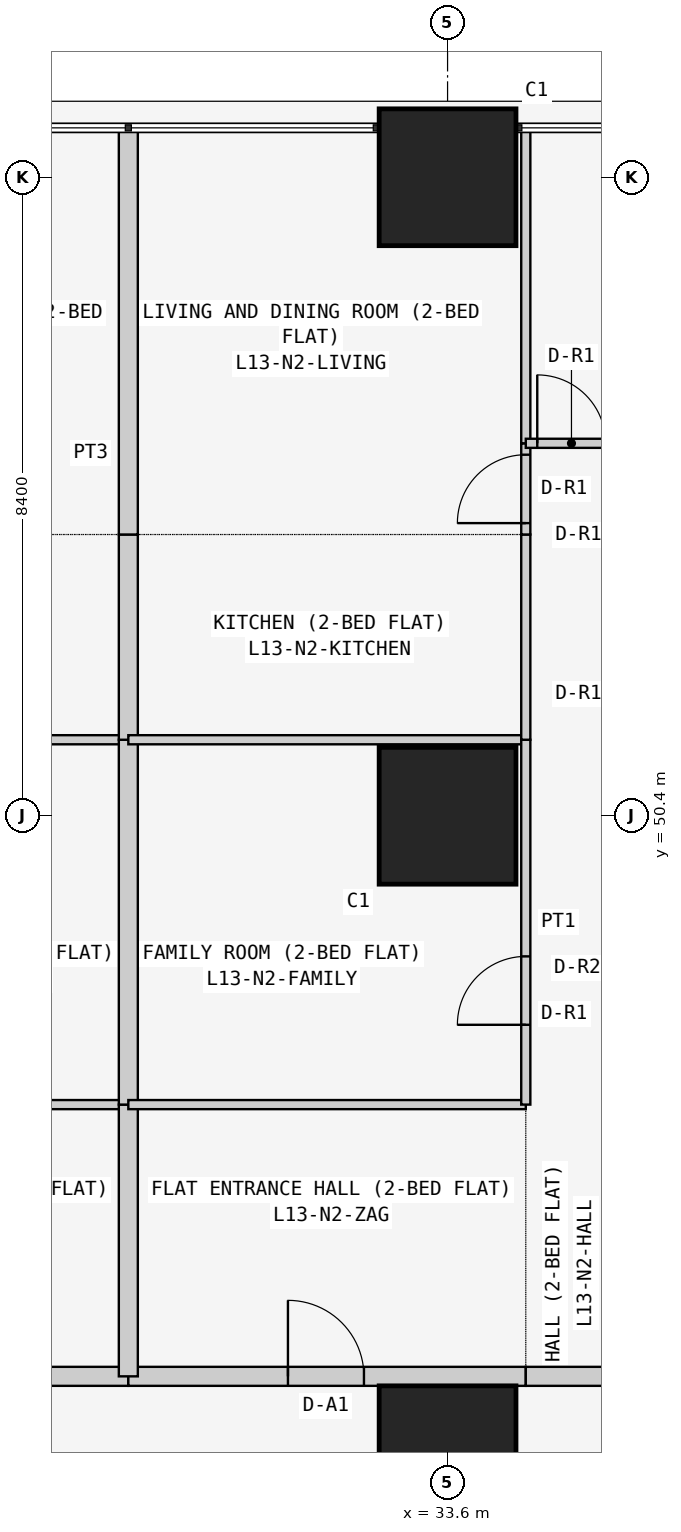
"""IFC4 building model, lengths in metres.
Left out: names, types, materials, properties, quantities, classifications, styles, units other than length and angle.
Written with IfcOpenShell. Run it as: python <this file> out.ifc"""

import sys

from ifc_helpers import new_model, si_unit, direction, frame, frame_2d, origin, origin_2d, place, context, subcontext, project, spatial, rectangle, extrude, element, fill, save


model = new_model("IFC4")
c1 = context("Model", 3, precision=1e-05, world=origin(), true_north=direction((0.0, 1.0)))
c2 = subcontext(c1, "Body", "Model", "MODEL_VIEW")
j1 = project(units=[si_unit("LENGTHUNIT", "METRE"), si_unit("PLANEANGLEUNIT", "RADIAN")], contexts=[c1])
p1 = place(None, origin())
s1 = spatial("IfcSite", under=j1, at=p1, CompositionType="ELEMENT")
p2 = place(p1, origin())
s2 = spatial("IfcBuilding", under=s1, at=p2, CompositionType="ELEMENT")
p3 = place(p2, frame((0.0, 0.0, 56.1)))
s3 = spatial("IfcBuildingStorey", under=s2, at=p3, CompositionType="ELEMENT", Elevation=56.1)
for number, where, z_axis, x_axis in (
    (1, (33.6, 42.0, 0.0), (0.0, 0.0, 1.0), (1.0, 0.0, 0.0)),
    (2, (33.6, 50.4, 0.0), (0.0, 0.0, 1.0), (1.0, 0.0, 0.0)),
    (3, (33.6, 58.8, 0.0), (0.0, 0.0, 1.0), (1.0, 0.0, 0.0)),
):
    element("IfcColumn", number, at=place(p3, frame(where, z_axis=z_axis, x_axis=x_axis)), inside=s3, PredefinedType="COLUMN", context=c2, shape_type="SweptSolid", body=[
        extrude(rectangle(XDim=1.8, YDim=1.8, at=origin_2d()), origin(), (0.0, 0.0, 1.0), 3.6),
    ])
p4 = place(p3, frame((24.171, 43.025, 0.0), z_axis=(0.0, 0.0, 1.0), x_axis=(1.0, 0.0, 0.0)))
e4 = element("IfcWall", 4, at=p4, inside=s3, PredefinedType="PARTITIONING", context=c2, shape_type="SweptSolid", body=[
    extrude(rectangle(XDim=5.229, YDim=0.25, at=frame_2d((2.615, 0.0))), origin(), (0.0, 0.0, 1.0), 3.45),
])
p5 = place(p4, frame((2.129, 0.0, 0.0)))
e5 = element("IfcOpeningElement", 5, at=p5, cuts=e4, PredefinedType="OPENING", context=c2, shape_type="SweptSolid", body=[
    extrude(rectangle(XDim=1.0, YDim=2.1, at=frame_2d((0.5, 1.05))), frame((0.0, 0.135, 0.0), z_axis=(0.0, -1.0, 0.0), x_axis=(1.0, 0.0, 0.0)), (0.0, 0.0, 1.0), 0.27),
])
p6 = place(p3, frame((29.4, 43.025, 0.0), z_axis=(0.0, 0.0, 1.0), x_axis=(1.0, 0.0, 0.0)))
e6 = element("IfcWall", 6, at=p6, inside=s3, PredefinedType="PARTITIONING", context=c2, shape_type="SweptSolid", body=[
    extrude(rectangle(XDim=5.229, YDim=0.25, at=frame_2d((2.615, 0.0))), origin(), (0.0, 0.0, 1.0), 3.45),
])
p7 = place(p6, frame((2.1, 0.0, 0.0)))
e7 = element("IfcOpeningElement", 7, at=p7, cuts=e6, PredefinedType="OPENING", context=c2, shape_type="SweptSolid", body=[
    extrude(rectangle(XDim=1.0, YDim=2.1, at=frame_2d((0.5, 1.05))), frame((0.0, 0.135, 0.0), z_axis=(0.0, -1.0, 0.0), x_axis=(1.0, 0.0, 0.0)), (0.0, 0.0, 1.0), 0.27),
])
p8 = place(p3, frame((34.629, 43.025, 0.0), z_axis=(0.0, 0.0, 1.0), x_axis=(1.0, 0.0, 0.0)))
e8 = element("IfcWall", 8, at=p8, inside=s3, PredefinedType="PARTITIONING", context=c2, shape_type="SweptSolid", body=[
    extrude(rectangle(XDim=1.2, YDim=0.25, at=frame_2d((0.6, 0.0))), origin(), (0.0, 0.0, 1.0), 3.45),
])
p9 = place(p3, frame((29.4, 46.6, 0.0), z_axis=(0.0, 0.0, 1.0), x_axis=(-1.0, 0.0, 0.0)))
e9 = element("IfcWall", 9, at=p9, inside=s3, PredefinedType="PARTITIONING", context=c2, shape_type="SweptSolid", body=[
    extrude(rectangle(XDim=5.229, YDim=0.12, at=frame_2d((2.615, 0.0))), origin(), (0.0, 0.0, 1.0), 3.45),
])
p10 = place(p3, frame((29.4, 43.025, 0.0), z_axis=(0.0, 0.0, 1.0), x_axis=(0.0, 1.0, 0.0)))
e10 = element("IfcWall", 10, at=p10, inside=s3, PredefinedType="PARTITIONING", context=c2, shape_type="SweptSolid", body=[
    extrude(rectangle(XDim=3.575, YDim=0.25, at=frame_2d((1.788, 0.0))), origin(), (0.0, 0.0, 1.0), 2.848),
])
p11 = place(p3, frame((29.4, 51.4, 0.0), z_axis=(0.0, 0.0, 1.0), x_axis=(-1.0, 0.0, 0.0)))
e11 = element("IfcWall", 11, at=p11, inside=s3, PredefinedType="PARTITIONING", context=c2, shape_type="SweptSolid", body=[
    extrude(rectangle(XDim=5.229, YDim=0.12, at=frame_2d((2.615, 0.0))), origin(), (0.0, 0.0, 1.0), 3.45),
])
p12 = place(p3, frame((29.4, 46.6, 0.0), z_axis=(0.0, 0.0, 1.0), x_axis=(0.0, 1.0, 0.0)))
e12 = element("IfcWall", 12, at=p12, inside=s3, PredefinedType="PARTITIONING", context=c2, shape_type="SweptSolid", body=[
    extrude(rectangle(XDim=4.8, YDim=0.25, at=frame_2d((2.4, 0.0))), origin(), (0.0, 0.0, 1.0), 2.848),
])
p13 = place(p3, frame((29.4, 51.4, 0.0), z_axis=(0.0, 0.0, 1.0), x_axis=(0.0, 1.0, 0.0)))
e13 = element("IfcWall", 13, at=p13, inside=s3, PredefinedType="PARTITIONING", context=c2, shape_type="SweptSolid", body=[
    extrude(rectangle(XDim=2.7, YDim=0.25, at=frame_2d((1.35, 0.0))), origin(), (0.0, 0.0, 1.0), 2.848),
])
p14 = place(p3, frame((29.4, 54.1, 0.0), z_axis=(0.0, 0.0, 1.0), x_axis=(0.0, 1.0, 0.0)))
e14 = element("IfcWall", 14, at=p14, inside=s3, PredefinedType="PARTITIONING", context=c2, shape_type="SweptSolid", body=[
    extrude(rectangle(XDim=5.35, YDim=0.25, at=frame_2d((2.675, 0.0))), origin(), (0.0, 0.0, 1.0), 2.848),
])
for number, where, z_axis, x_axis in (
    (15, (29.4, 46.6, 0.0), (0.0, 0.0, 1.0), (1.0, 0.0, 0.0)),
    (16, (29.4, 51.4, 0.0), (0.0, 0.0, 1.0), (1.0, 0.0, 0.0)),
):
    element("IfcWall", number, at=place(p3, frame(where, z_axis=z_axis, x_axis=x_axis)), inside=s3, PredefinedType="PARTITIONING", context=c2, shape_type="SweptSolid", body=[
        extrude(rectangle(XDim=5.229, YDim=0.12, at=frame_2d((2.615, 0.0))), origin(), (0.0, 0.0, 1.0), 3.45),
    ])
p15 = place(p3, frame((34.629, 51.4, 0.0), z_axis=(0.0, 0.0, 1.0), x_axis=(0.0, -1.0, 0.0)))
e17 = element("IfcWall", 17, at=p15, inside=s3, PredefinedType="PARTITIONING", context=c2, shape_type="SweptSolid", body=[
    extrude(rectangle(XDim=4.8, YDim=0.12, at=frame_2d((2.4, 0.0))), origin(), (0.0, 0.0, 1.0), 3.45),
])
p16 = place(p15, frame((2.85, 0.0, 0.0)))
e18 = element("IfcOpeningElement", 18, at=p16, cuts=e17, PredefinedType="OPENING", context=c2, shape_type="SweptSolid", body=[
    extrude(rectangle(XDim=0.9, YDim=2.1, at=frame_2d((0.45, 1.05))), frame((0.0, 0.07, 0.0), z_axis=(0.0, -1.0, 0.0), x_axis=(1.0, 0.0, 0.0)), (0.0, 0.0, 1.0), 0.14),
])
p17 = place(p3, frame((34.629, 54.1, 0.0), z_axis=(0.0, 0.0, 1.0), x_axis=(0.0, -1.0, 0.0)))
e19 = element("IfcWall", 19, at=p17, inside=s3, PredefinedType="PARTITIONING", context=c2, shape_type="SweptSolid", body=[
    extrude(rectangle(XDim=2.7, YDim=0.12, at=frame_2d((1.35, 0.0))), origin(), (0.0, 0.0, 1.0), 3.45),
])
p18 = place(p3, frame((34.629, 55.3, 0.0), z_axis=(0.0, 0.0, 1.0), x_axis=(0.0, -1.0, 0.0)))
e20 = element("IfcWall", 20, at=p18, inside=s3, PredefinedType="PARTITIONING", context=c2, shape_type="SweptSolid", body=[
    extrude(rectangle(XDim=1.2, YDim=0.12, at=frame_2d((0.6, 0.0))), origin(), (0.0, 0.0, 1.0), 3.45),
])
p19 = place(p18, frame((0.15, 0.0, 0.0)))
e21 = element("IfcOpeningElement", 21, at=p19, cuts=e20, PredefinedType="OPENING", context=c2, shape_type="SweptSolid", body=[
    extrude(rectangle(XDim=0.9, YDim=2.1, at=frame_2d((0.45, 1.05))), frame((0.0, 0.07, 0.0), z_axis=(0.0, -1.0, 0.0), x_axis=(1.0, 0.0, 0.0)), (0.0, 0.0, 1.0), 0.14),
])
p20 = place(p3, frame((34.629, 59.45, 0.0), z_axis=(0.0, 0.0, 1.0), x_axis=(0.0, -1.0, 0.0)))
e22 = element("IfcWall", 22, at=p20, inside=s3, PredefinedType="PARTITIONING", context=c2, shape_type="SweptSolid", body=[
    extrude(rectangle(XDim=4.15, YDim=0.12, at=frame_2d((2.075, 0.0))), origin(), (0.0, 0.0, 1.0), 3.45),
])
p21 = place(p3, frame((34.629, 55.3, 0.0), z_axis=(0.0, 0.0, 1.0), x_axis=(1.0, 0.0, 0.0)))
e23 = element("IfcWall", 23, at=p21, inside=s3, PredefinedType="PARTITIONING", context=c2, shape_type="SweptSolid", body=[
    extrude(rectangle(XDim=1.2, YDim=0.12, at=frame_2d((0.6, 0.0))), origin(), (0.0, 0.0, 1.0), 3.45),
])
p22 = place(p21, frame((0.151, 0.0, 0.0)))
e24 = element("IfcOpeningElement", 24, at=p22, cuts=e23, PredefinedType="OPENING", context=c2, shape_type="SweptSolid", body=[
    extrude(rectangle(XDim=0.9, YDim=2.1, at=frame_2d((0.45, 1.05))), frame((0.0, 0.07, 0.0), z_axis=(0.0, -1.0, 0.0), x_axis=(1.0, 0.0, 0.0)), (0.0, 0.0, 1.0), 0.14),
])
p23 = place(p7, origin())
e25 = element("IfcDoor", 25, at=p23, inside=s3, OperationType="SINGLE_SWING_LEFT", PredefinedType="DOOR", context=c2, shape_type="SweptSolid", body=[
    extrude(rectangle(XDim=1.0, YDim=2.1, at=frame_2d((0.5, 1.05))), frame((0.0, 0.025, 0.0), z_axis=(0.0, -1.0, 0.0), x_axis=(1.0, 0.0, 0.0)), (0.0, 0.0, 1.0), 0.05),
])
fill(e7, e25)
p24 = place(p16, frame((0.9, 0.0, 0.0), z_axis=(0.0, 0.0, 1.0), x_axis=(-1.0, 0.0, 0.0)))
e26 = element("IfcDoor", 26, at=p24, inside=s3, OperationType="SINGLE_SWING_LEFT", PredefinedType="DOOR", context=c2, shape_type="SweptSolid", body=[
    extrude(rectangle(XDim=0.9, YDim=2.1, at=frame_2d((0.45, 1.05))), frame((0.0, 0.025, 0.0), z_axis=(0.0, -1.0, 0.0), x_axis=(1.0, 0.0, 0.0)), (0.0, 0.0, 1.0), 0.05),
])
fill(e18, e26)
p25 = place(p19, frame((0.9, 0.0, 0.0), z_axis=(0.0, 0.0, 1.0), x_axis=(-1.0, 0.0, 0.0)))
e27 = element("IfcDoor", 27, at=p25, inside=s3, OperationType="SINGLE_SWING_LEFT", PredefinedType="DOOR", context=c2, shape_type="SweptSolid", body=[
    extrude(rectangle(XDim=0.9, YDim=2.1, at=frame_2d((0.45, 1.05))), frame((0.0, 0.025, 0.0), z_axis=(0.0, -1.0, 0.0), x_axis=(1.0, 0.0, 0.0)), (0.0, 0.0, 1.0), 0.05),
])
fill(e21, e27)
p26 = place(p22, origin())
e28 = element("IfcDoor", 28, at=p26, inside=s3, OperationType="SINGLE_SWING_LEFT", PredefinedType="DOOR", context=c2, shape_type="SweptSolid", body=[
    extrude(rectangle(XDim=0.9, YDim=2.1, at=frame_2d((0.45, 1.05))), frame((0.0, 0.025, 0.0), z_axis=(0.0, -1.0, 0.0), x_axis=(1.0, 0.0, 0.0)), (0.0, 0.0, 1.0), 0.05),
])
fill(e24, e28)
save(model, sys.argv[1])
